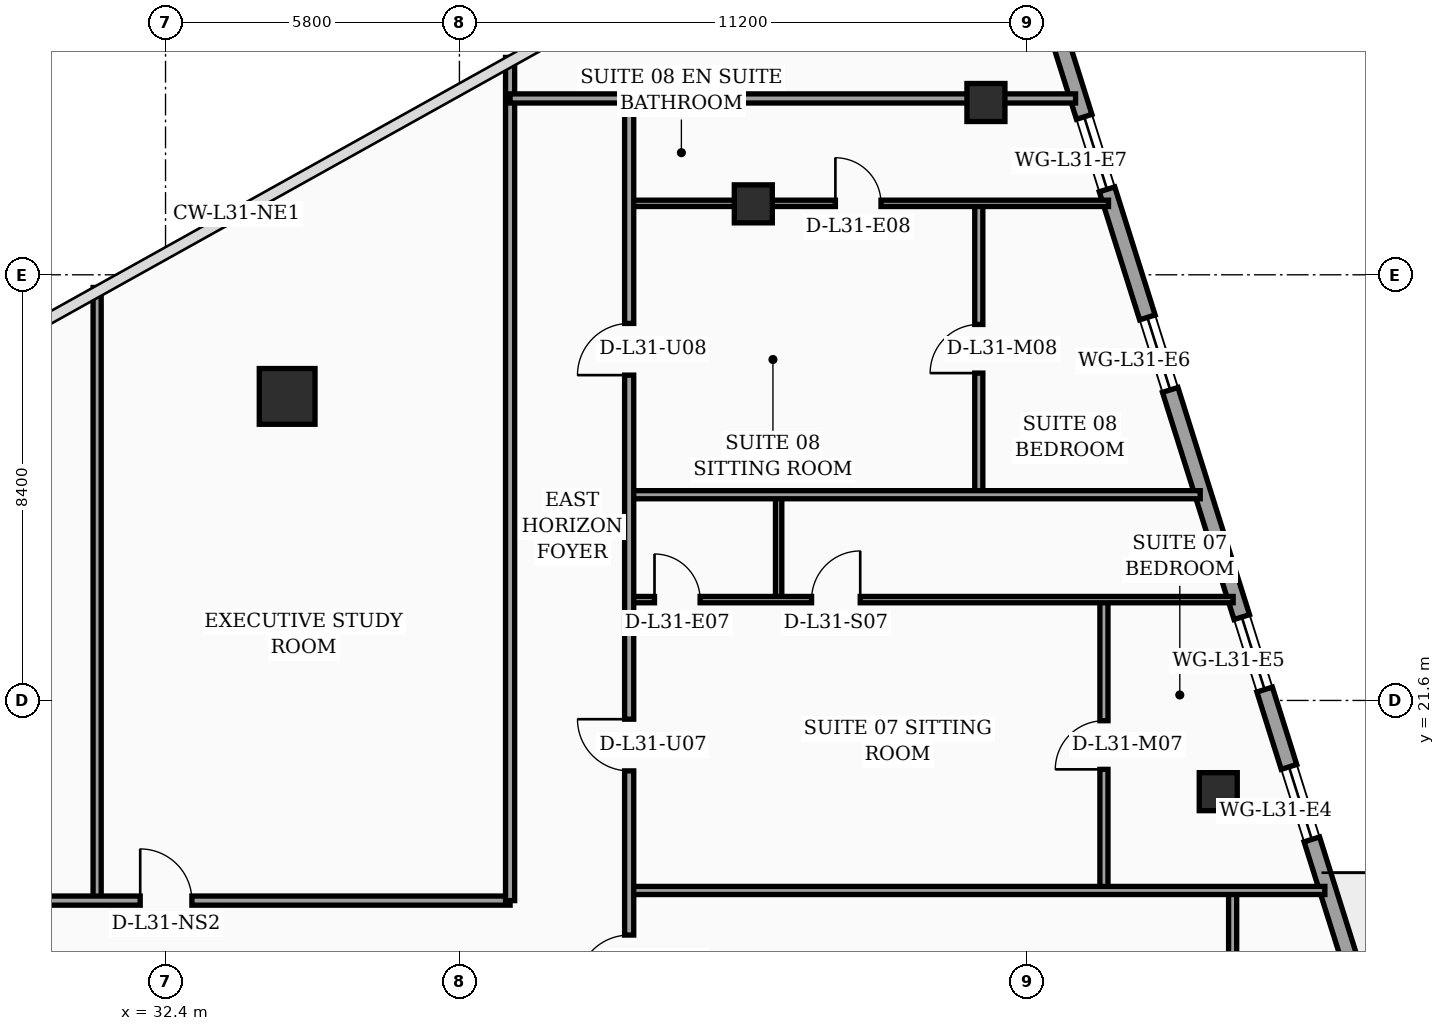
"""IFC4 building model, lengths in metres.
Left out: names, types, materials, properties, quantities, classifications, styles, units other than length and angle.
Written with IfcOpenShell. Run it as: python <this file> out.ifc"""

import sys

from ifc_helpers import new_model, si_unit, direction, frame, frame_2d, origin, origin_2d, place, context, subcontext, project, spatial, rectangle, hollow_rectangle, circle, extrude, element, fill, save


model = new_model("IFC4")
c1 = context("Model", 3, precision=1e-05, world=origin(), true_north=direction((0.0, 1.0)))
c2 = subcontext(c1, "Body", "Model", "MODEL_VIEW")
j1 = project(units=[si_unit("LENGTHUNIT", "METRE"), si_unit("PLANEANGLEUNIT", "RADIAN")], contexts=[c1])
p1 = place(None, origin())
s1 = spatial("IfcSite", under=j1, at=p1, CompositionType="ELEMENT")
p2 = place(p1, origin())
s2 = spatial("IfcBuilding", under=s1, at=p2, CompositionType="ELEMENT")
p3 = place(p2, frame((0.0, 0.0, 127.8)))
s3 = spatial("IfcBuildingStorey", under=s2, at=p3, CompositionType="ELEMENT", Elevation=127.8)
p4 = place(p3, frame((34.8, 27.6, 0.0), z_axis=(0.0, 0.0, 1.0), x_axis=(1.0, 0.0, 0.0)))
e1 = element("IfcColumn", 1, at=p4, inside=s3, PredefinedType="COLUMN", context=c2, shape_type="SweptSolid", body=[
    extrude(circle(Radius=0.55, at=origin_2d()), origin(), (0.0, 0.0, 1.0), 3.56),
])
for number, where, z_axis, x_axis in (
    (2, (44.0, 31.4, 0.0), (0.0, 0.0, 1.0), (1.0, 0.0, 0.0)),
    (3, (53.176, 19.8, 0.0), (0.0, 0.0, 1.0), (1.0, 0.0, 0.0)),
    (4, (48.591, 33.4, 0.0), (0.0, 0.0, 1.0), (1.0, 0.0, 0.0)),
):
    element("IfcColumn", number, at=place(p3, frame(where, z_axis=z_axis, x_axis=x_axis)), inside=s3, PredefinedType="COLUMN", context=c2, shape_type="SweptSolid", body=[
        extrude(hollow_rectangle(XDim=0.75, YDim=0.75, WallThickness=0.032, at=origin_2d()), origin(), (0.0, 0.0, 1.0), 3.56),
    ])
p5 = place(p3, frame((59.23, 5.505, 0.0), z_axis=(0.0, 0.0, 1.0), x_axis=(-0.300509063924, 0.953778958931, 0.0)))
e5 = element("IfcWall", 5, at=p5, inside=s3, PredefinedType="SOLIDWALL", context=c2, shape_type="SweptSolid", body=[
    extrude(rectangle(XDim=30.814, YDim=0.32, at=frame_2d((15.407, 0.0))), origin(), (0.0, 0.0, 1.0), 3.56),
])
p6 = place(p5, frame((10.199, 0.0, 0.0)))
e6 = element("IfcOpeningElement", 6, at=p6, cuts=e5, PredefinedType="OPENING", context=c2, shape_type="SweptSolid", body=[
    extrude(rectangle(XDim=1.4, YDim=2.25, at=frame_2d((0.7, 1.125))), frame((0.0, 0.17, 0.0), z_axis=(0.0, -1.0, 0.0), x_axis=(1.0, 0.0, 0.0)), (0.0, 0.0, 1.0), 0.34),
])
p7 = place(p5, frame((2.65, 0.0, 0.75)))
e7 = element("IfcOpeningElement", 7, at=p7, cuts=e5, PredefinedType="OPENING", context=c2, shape_type="SweptSolid", body=[
    extrude(rectangle(XDim=1.5, YDim=1.6, at=frame_2d((0.75, 0.8))), frame((0.0, 0.17, 0.0), z_axis=(0.0, -1.0, 0.0), x_axis=(1.0, 0.0, 0.0)), (0.0, 0.0, 1.0), 0.34),
])
p8 = place(p5, frame((4.7, 0.0, 0.75)))
e8 = element("IfcOpeningElement", 8, at=p8, cuts=e5, PredefinedType="OPENING", context=c2, shape_type="SweptSolid", body=[
    extrude(rectangle(XDim=1.5, YDim=1.6, at=frame_2d((0.75, 0.8))), frame((0.0, 0.17, 0.0), z_axis=(0.0, -1.0, 0.0), x_axis=(1.0, 0.0, 0.0)), (0.0, 0.0, 1.0), 0.34),
])
p9 = place(p5, frame((7.8, 0.0, 0.75)))
e9 = element("IfcOpeningElement", 9, at=p9, cuts=e5, PredefinedType="OPENING", context=c2, shape_type="SweptSolid", body=[
    extrude(rectangle(XDim=1.5, YDim=1.6, at=frame_2d((0.75, 0.8))), frame((0.0, 0.17, 0.0), z_axis=(0.0, -1.0, 0.0), x_axis=(1.0, 0.0, 0.0)), (0.0, 0.0, 1.0), 0.34),
])
p10 = place(p5, frame((14.0, 0.0, 0.75)))
e10 = element("IfcOpeningElement", 10, at=p10, cuts=e5, PredefinedType="OPENING", context=c2, shape_type="SweptSolid", body=[
    extrude(rectangle(XDim=1.5, YDim=1.6, at=frame_2d((0.75, 0.8))), frame((0.0, 0.17, 0.0), z_axis=(0.0, -1.0, 0.0), x_axis=(1.0, 0.0, 0.0)), (0.0, 0.0, 1.0), 0.34),
])
p11 = place(p5, frame((17.1, 0.0, 0.75)))
e11 = element("IfcOpeningElement", 11, at=p11, cuts=e5, PredefinedType="OPENING", context=c2, shape_type="SweptSolid", body=[
    extrude(rectangle(XDim=1.5, YDim=1.6, at=frame_2d((0.75, 0.8))), frame((0.0, 0.17, 0.0), z_axis=(0.0, -1.0, 0.0), x_axis=(1.0, 0.0, 0.0)), (0.0, 0.0, 1.0), 0.34),
])
p12 = place(p5, frame((23.3, 0.0, 0.75)))
e12 = element("IfcOpeningElement", 12, at=p12, cuts=e5, PredefinedType="OPENING", context=c2, shape_type="SweptSolid", body=[
    extrude(rectangle(XDim=1.5, YDim=1.6, at=frame_2d((0.75, 0.8))), frame((0.0, 0.17, 0.0), z_axis=(0.0, -1.0, 0.0), x_axis=(1.0, 0.0, 0.0)), (0.0, 0.0, 1.0), 0.34),
])
p13 = place(p5, frame((27.45, 0.0, 0.75)))
e13 = element("IfcOpeningElement", 13, at=p13, cuts=e5, PredefinedType="OPENING", context=c2, shape_type="SweptSolid", body=[
    extrude(rectangle(XDim=1.5, YDim=1.6, at=frame_2d((0.75, 0.8))), frame((0.0, 0.17, 0.0), z_axis=(0.0, -1.0, 0.0), x_axis=(1.0, 0.0, 0.0)), (0.0, 0.0, 1.0), 0.34),
])
p14 = place(p3, frame((31.05, 17.65, 0.0), z_axis=(0.0, 0.0, 1.0), x_axis=(0.0, 1.0, 0.0)))
e14 = element("IfcWall", 14, at=p14, inside=s3, PredefinedType="PARTITIONING", context=c2, shape_type="SweptSolid", body=[
    extrude(rectangle(XDim=12.1, YDim=0.16, at=frame_2d((6.05, 0.0))), origin(), (0.0, 0.0, 1.0), 2.84),
])
p15 = place(p3, frame((21.5, 17.65, 0.0), z_axis=(0.0, 0.0, 1.0), x_axis=(1.0, 0.0, 0.0)))
e15 = element("IfcWall", 15, at=p15, inside=s3, PredefinedType="PARTITIONING", context=c2, shape_type="SweptSolid", body=[
    extrude(rectangle(XDim=17.7, YDim=0.18, at=frame_2d((8.85, 0.0))), origin(), (0.0, 0.0, 1.0), 2.84),
])
p16 = place(p15, frame((0.95, 0.0, 0.0)))
e16 = element("IfcOpeningElement", 16, at=p16, cuts=e15, PredefinedType="OPENING", context=c2, shape_type="SweptSolid", body=[
    extrude(rectangle(XDim=1.02, YDim=2.2, at=frame_2d((0.51, 1.1))), frame((0.0, 0.1, 0.0), z_axis=(0.0, -1.0, 0.0), x_axis=(1.0, 0.0, 0.0)), (0.0, 0.0, 1.0), 0.2),
])
p17 = place(p15, frame((10.4, 0.0, 0.0)))
e17 = element("IfcOpeningElement", 17, at=p17, cuts=e15, PredefinedType="OPENING", context=c2, shape_type="SweptSolid", body=[
    extrude(rectangle(XDim=1.02, YDim=2.2, at=frame_2d((0.51, 1.1))), frame((0.0, 0.1, 0.0), z_axis=(0.0, -1.0, 0.0), x_axis=(1.0, 0.0, 0.0)), (0.0, 0.0, 1.0), 0.2),
])
p18 = place(p3, frame((39.2, 17.65, 0.0), z_axis=(0.0, 0.0, 1.0), x_axis=(0.0, 1.0, 0.0)))
e18 = element("IfcWall", 18, at=p18, inside=s3, PredefinedType="PARTITIONING", context=c2, shape_type="SweptSolid", body=[
    extrude(rectangle(XDim=16.64, YDim=0.18, at=frame_2d((8.32, 0.0))), origin(), (0.0, 0.0, 1.0), 2.84),
])
p19 = place(p3, frame((53.46, 7.45, 0.0), z_axis=(0.0, 0.0, 1.0), x_axis=(0.0, 1.0, 0.0)))
e19 = element("IfcWall", 19, at=p19, inside=s3, PredefinedType="PARTITIONING", context=c2, shape_type="SweptSolid", body=[
    extrude(rectangle(XDim=10.4, YDim=0.16, at=frame_2d((5.2, 0.0))), origin(), (0.0, 0.0, 1.0), 3.04),
])
p20 = place(p19, frame((4.72, 0.0, 0.0)))
e20 = element("IfcOpeningElement", 20, at=p20, cuts=e19, PredefinedType="OPENING", context=c2, shape_type="SweptSolid", body=[
    extrude(rectangle(XDim=0.96, YDim=2.2, at=frame_2d((0.48, 1.1))), frame((0.0, 0.09, 0.0), z_axis=(0.0, -1.0, 0.0), x_axis=(1.0, 0.0, 0.0)), (0.0, 0.0, 1.0), 0.18),
])
p21 = place(p3, frame((44.5, 23.59, 0.0), z_axis=(0.0, 0.0, 1.0), x_axis=(0.0, 1.0, 0.0)))
e21 = element("IfcWall", 21, at=p21, inside=s3, PredefinedType="PARTITIONING", context=c2, shape_type="SweptSolid", body=[
    extrude(rectangle(XDim=2.07, YDim=0.125, at=frame_2d((1.035, 0.0))), origin(), (0.0, 0.0, 1.0), 3.19),
])
p22 = place(p3, frame((50.92, 17.85, 0.0), z_axis=(0.0, 0.0, 1.0), x_axis=(0.0, 1.0, 0.0)))
e22 = element("IfcWall", 22, at=p22, inside=s3, PredefinedType="PARTITIONING", context=c2, shape_type="SweptSolid", body=[
    extrude(rectangle(XDim=5.74, YDim=0.16, at=frame_2d((2.87, 0.0))), origin(), (0.0, 0.0, 1.0), 2.84),
])
p23 = place(p22, frame((2.39, 0.0, 0.0)))
e23 = element("IfcOpeningElement", 23, at=p23, cuts=e22, PredefinedType="OPENING", context=c2, shape_type="SweptSolid", body=[
    extrude(rectangle(XDim=0.96, YDim=2.2, at=frame_2d((0.48, 1.1))), frame((0.0, 0.09, 0.0), z_axis=(0.0, -1.0, 0.0), x_axis=(1.0, 0.0, 0.0)), (0.0, 0.0, 1.0), 0.18),
])
p24 = place(p3, frame((41.55, 23.59, 0.0), z_axis=(0.0, 0.0, 1.0), x_axis=(1.0, 0.0, 0.0)))
e24 = element("IfcWall", 24, at=p24, inside=s3, PredefinedType="PARTITIONING", context=c2, shape_type="SweptSolid", body=[
    extrude(rectangle(XDim=11.92, YDim=0.125, at=frame_2d((5.96, 0.0))), origin(), (0.0, 0.0, 1.0), 2.84),
])
p25 = place(p24, frame((0.5, 0.0, 0.0)))
e25 = element("IfcOpeningElement", 25, at=p25, cuts=e24, PredefinedType="OPENING", context=c2, shape_type="SweptSolid", body=[
    extrude(rectangle(XDim=0.9, YDim=2.15, at=frame_2d((0.45, 1.075))), frame((0.0, 0.073, 0.0), z_axis=(0.0, -1.0, 0.0), x_axis=(1.0, 0.0, 0.0)), (0.0, 0.0, 1.0), 0.145),
])
p26 = place(p24, frame((3.6, 0.0, 0.0)))
e26 = element("IfcOpeningElement", 26, at=p26, cuts=e24, PredefinedType="OPENING", context=c2, shape_type="SweptSolid", body=[
    extrude(rectangle(XDim=0.96, YDim=2.2, at=frame_2d((0.48, 1.1))), frame((0.0, 0.073, 0.0), z_axis=(0.0, -1.0, 0.0), x_axis=(1.0, 0.0, 0.0)), (0.0, 0.0, 1.0), 0.145),
])
p27 = place(p3, frame((48.45, 25.66, 0.0), z_axis=(0.0, 0.0, 1.0), x_axis=(0.0, 1.0, 0.0)))
e27 = element("IfcWall", 27, at=p27, inside=s3, PredefinedType="PARTITIONING", context=c2, shape_type="SweptSolid", body=[
    extrude(rectangle(XDim=5.75, YDim=0.16, at=frame_2d((2.875, 0.0))), origin(), (0.0, 0.0, 1.0), 3.56),
])
p28 = place(p27, frame((2.4, 0.0, 0.0)))
e28 = element("IfcOpeningElement", 28, at=p28, cuts=e27, PredefinedType="OPENING", context=c2, shape_type="SweptSolid", body=[
    extrude(rectangle(XDim=0.96, YDim=2.2, at=frame_2d((0.48, 1.1))), frame((0.0, 0.09, 0.0), z_axis=(0.0, -1.0, 0.0), x_axis=(1.0, 0.0, 0.0)), (0.0, 0.0, 1.0), 0.18),
])
p29 = place(p3, frame((41.55, 31.41, 0.0), z_axis=(0.0, 0.0, 1.0), x_axis=(1.0, 0.0, 0.0)))
e29 = element("IfcWall", 29, at=p29, inside=s3, PredefinedType="PARTITIONING", context=c2, shape_type="SweptSolid", body=[
    extrude(rectangle(XDim=9.46, YDim=0.125, at=frame_2d((4.73, 0.0))), origin(), (0.0, 0.0, 1.0), 2.84),
])
p30 = place(p29, frame((4.07, 0.0, 0.0)))
e30 = element("IfcOpeningElement", 30, at=p30, cuts=e29, PredefinedType="OPENING", context=c2, shape_type="SweptSolid", body=[
    extrude(rectangle(XDim=0.9, YDim=2.15, at=frame_2d((0.45, 1.075))), frame((0.0, 0.073, 0.0), z_axis=(0.0, -1.0, 0.0), x_axis=(1.0, 0.0, 0.0)), (0.0, 0.0, 1.0), 0.145),
])
p31 = place(p3, frame((41.55, 25.66, 0.0), z_axis=(0.0, 0.0, 1.0), x_axis=(1.0, 0.0, 0.0)))
e31 = element("IfcWall", 31, at=p31, inside=s3, PredefinedType="PARTITIONING", context=c2, shape_type="SweptSolid", body=[
    extrude(rectangle(XDim=11.27, YDim=0.16, at=frame_2d((5.635, 0.0))), origin(), (0.0, 0.0, 1.0), 2.84),
])
p32 = place(p3, frame((41.55, 17.85, 0.0), z_axis=(0.0, 0.0, 1.0), x_axis=(1.0, 0.0, 0.0)))
e32 = element("IfcWall", 32, at=p32, inside=s3, PredefinedType="PARTITIONING", context=c2, shape_type="SweptSolid", body=[
    extrude(rectangle(XDim=13.73, YDim=0.16, at=frame_2d((6.865, 0.0))), origin(), (0.0, 0.0, 1.0), 2.84),
])
p33 = place(p3, frame((41.55, 33.48, 0.0), z_axis=(0.0, 0.0, 1.0), x_axis=(1.0, 0.0, 0.0)))
e33 = element("IfcWall", 33, at=p33, inside=s3, PredefinedType="PARTITIONING", context=c2, shape_type="SweptSolid", body=[
    extrude(rectangle(XDim=8.81, YDim=0.18, at=frame_2d((4.405, 0.0))), origin(), (0.0, 0.0, 1.0), 2.84),
])
p34 = place(p3, frame((41.55, 2.44, 0.0), z_axis=(0.0, 0.0, 1.0), x_axis=(0.0, 1.0, 0.0)))
e34 = element("IfcWall", 34, at=p34, inside=s3, PredefinedType="PARTITIONING", context=c2, shape_type="SweptSolid", body=[
    extrude(rectangle(XDim=31.04, YDim=0.18, at=frame_2d((15.52, 0.0))), origin(), (0.0, 0.0, 1.0), 2.84),
])
p35 = place(p34, frame((13.51, 0.0, 0.0)))
e35 = element("IfcOpeningElement", 35, at=p35, cuts=e34, PredefinedType="OPENING", context=c2, shape_type="SweptSolid", body=[
    extrude(rectangle(XDim=1.02, YDim=2.2, at=frame_2d((0.51, 1.1))), frame((0.0, 0.1, 0.0), z_axis=(0.0, -1.0, 0.0), x_axis=(1.0, 0.0, 0.0)), (0.0, 0.0, 1.0), 0.2),
])
p36 = place(p34, frame((17.77, 0.0, 0.0)))
e36 = element("IfcOpeningElement", 36, at=p36, cuts=e34, PredefinedType="OPENING", context=c2, shape_type="SweptSolid", body=[
    extrude(rectangle(XDim=1.02, YDim=2.2, at=frame_2d((0.51, 1.1))), frame((0.0, 0.1, 0.0), z_axis=(0.0, -1.0, 0.0), x_axis=(1.0, 0.0, 0.0)), (0.0, 0.0, 1.0), 0.2),
])
p37 = place(p34, frame((25.58, 0.0, 0.0)))
e37 = element("IfcOpeningElement", 37, at=p37, cuts=e34, PredefinedType="OPENING", context=c2, shape_type="SweptSolid", body=[
    extrude(rectangle(XDim=1.02, YDim=2.2, at=frame_2d((0.51, 1.1))), frame((0.0, 0.1, 0.0), z_axis=(0.0, -1.0, 0.0), x_axis=(1.0, 0.0, 0.0)), (0.0, 0.0, 1.0), 0.2),
])
p38 = place(p3, frame((39.2, 33.48, 0.0), z_axis=(0.0, 0.0, 1.0), x_axis=(1.0, 0.0, 0.0)))
e38 = element("IfcWall", 38, at=p38, inside=s3, PredefinedType="PARTITIONING", context=c2, shape_type="SweptSolid", body=[
    extrude(rectangle(XDim=2.35, YDim=0.18, at=frame_2d((1.175, 0.0))), origin(), (0.0, 0.0, 1.0), 3.56),
])
p39 = place(p10, origin())
e39 = element("IfcWindow", 39, at=p39, inside=s3, PartitioningType="SINGLE_PANEL", PredefinedType="WINDOW", context=c2, shape_type="SweptSolid", body=[
    extrude(rectangle(XDim=1.5, YDim=1.6, at=frame_2d((0.75, 0.8))), frame((0.0, 0.03, 0.0), z_axis=(0.0, -1.0, 0.0), x_axis=(1.0, 0.0, 0.0)), (0.0, 0.0, 1.0), 0.06),
])
fill(e10, e39)
p40 = place(p11, origin())
e40 = element("IfcWindow", 40, at=p40, inside=s3, PartitioningType="SINGLE_PANEL", PredefinedType="WINDOW", context=c2, shape_type="SweptSolid", body=[
    extrude(rectangle(XDim=1.5, YDim=1.6, at=frame_2d((0.75, 0.8))), frame((0.0, 0.03, 0.0), z_axis=(0.0, -1.0, 0.0), x_axis=(1.0, 0.0, 0.0)), (0.0, 0.0, 1.0), 0.06),
])
fill(e11, e40)
p41 = place(p12, origin())
e41 = element("IfcWindow", 41, at=p41, inside=s3, PartitioningType="SINGLE_PANEL", PredefinedType="WINDOW", context=c2, shape_type="SweptSolid", body=[
    extrude(rectangle(XDim=1.5, YDim=1.6, at=frame_2d((0.75, 0.8))), frame((0.0, 0.03, 0.0), z_axis=(0.0, -1.0, 0.0), x_axis=(1.0, 0.0, 0.0)), (0.0, 0.0, 1.0), 0.06),
])
fill(e12, e41)
p42 = place(p13, origin())
e42 = element("IfcWindow", 42, at=p42, inside=s3, PartitioningType="SINGLE_PANEL", PredefinedType="WINDOW", context=c2, shape_type="SweptSolid", body=[
    extrude(rectangle(XDim=1.5, YDim=1.6, at=frame_2d((0.75, 0.8))), frame((0.0, 0.03, 0.0), z_axis=(0.0, -1.0, 0.0), x_axis=(1.0, 0.0, 0.0)), (0.0, 0.0, 1.0), 0.06),
])
fill(e13, e42)
p43 = place(p17, origin())
e43 = element("IfcDoor", 43, at=p43, inside=s3, OperationType="SINGLE_SWING_LEFT", PredefinedType="DOOR", context=c2, shape_type="SweptSolid", body=[
    extrude(rectangle(XDim=1.02, YDim=2.2, at=frame_2d((0.51, 1.1))), frame((0.0, 0.025, 0.0), z_axis=(0.0, -1.0, 0.0), x_axis=(1.0, 0.0, 0.0)), (0.0, 0.0, 1.0), 0.05),
])
fill(e17, e43)
p44 = place(p23, origin())
e44 = element("IfcDoor", 44, at=p44, inside=s3, OperationType="SINGLE_SWING_LEFT", PredefinedType="DOOR", context=c2, shape_type="SweptSolid", body=[
    extrude(rectangle(XDim=0.96, YDim=2.2, at=frame_2d((0.48, 1.1))), frame((0.0, 0.025, 0.0), z_axis=(0.0, -1.0, 0.0), x_axis=(1.0, 0.0, 0.0)), (0.0, 0.0, 1.0), 0.05),
])
fill(e23, e44)
p45 = place(p25, origin())
e45 = element("IfcDoor", 45, at=p45, inside=s3, OperationType="SINGLE_SWING_LEFT", PredefinedType="DOOR", context=c2, shape_type="SweptSolid", body=[
    extrude(rectangle(XDim=0.9, YDim=2.15, at=frame_2d((0.45, 1.075))), frame((0.0, 0.025, 0.0), z_axis=(0.0, -1.0, 0.0), x_axis=(1.0, 0.0, 0.0)), (0.0, 0.0, 1.0), 0.05),
])
fill(e25, e45)
p46 = place(p26, origin())
e46 = element("IfcDoor", 46, at=p46, inside=s3, OperationType="SINGLE_SWING_RIGHT", PredefinedType="DOOR", context=c2, shape_type="SweptSolid", body=[
    extrude(rectangle(XDim=0.96, YDim=2.2, at=frame_2d((0.48, 1.1))), frame((0.0, 0.025, 0.0), z_axis=(0.0, -1.0, 0.0), x_axis=(1.0, 0.0, 0.0)), (0.0, 0.0, 1.0), 0.05),
])
fill(e26, e46)
p47 = place(p28, origin())
e47 = element("IfcDoor", 47, at=p47, inside=s3, OperationType="SINGLE_SWING_LEFT", PredefinedType="DOOR", context=c2, shape_type="SweptSolid", body=[
    extrude(rectangle(XDim=0.96, YDim=2.2, at=frame_2d((0.48, 1.1))), frame((0.0, 0.025, 0.0), z_axis=(0.0, -1.0, 0.0), x_axis=(1.0, 0.0, 0.0)), (0.0, 0.0, 1.0), 0.05),
])
fill(e28, e47)
p48 = place(p30, origin())
e48 = element("IfcDoor", 48, at=p48, inside=s3, OperationType="SINGLE_SWING_LEFT", PredefinedType="DOOR", context=c2, shape_type="SweptSolid", body=[
    extrude(rectangle(XDim=0.9, YDim=2.15, at=frame_2d((0.45, 1.075))), frame((0.0, 0.025, 0.0), z_axis=(0.0, -1.0, 0.0), x_axis=(1.0, 0.0, 0.0)), (0.0, 0.0, 1.0), 0.05),
])
fill(e30, e48)
p49 = place(p35, origin())
e49 = element("IfcDoor", 49, at=p49, inside=s3, OperationType="SINGLE_SWING_LEFT", PredefinedType="DOOR", context=c2, shape_type="SweptSolid", body=[
    extrude(rectangle(XDim=1.02, YDim=2.2, at=frame_2d((0.51, 1.1))), frame((0.0, 0.025, 0.0), z_axis=(0.0, -1.0, 0.0), x_axis=(1.0, 0.0, 0.0)), (0.0, 0.0, 1.0), 0.05),
])
fill(e35, e49)
p50 = place(p36, origin())
e50 = element("IfcDoor", 50, at=p50, inside=s3, OperationType="SINGLE_SWING_RIGHT", PredefinedType="DOOR", context=c2, shape_type="SweptSolid", body=[
    extrude(rectangle(XDim=1.02, YDim=2.2, at=frame_2d((0.51, 1.1))), frame((0.0, 0.025, 0.0), z_axis=(0.0, -1.0, 0.0), x_axis=(1.0, 0.0, 0.0)), (0.0, 0.0, 1.0), 0.05),
])
fill(e36, e50)
p51 = place(p37, origin())
e51 = element("IfcDoor", 51, at=p51, inside=s3, OperationType="SINGLE_SWING_LEFT", PredefinedType="DOOR", context=c2, shape_type="SweptSolid", body=[
    extrude(rectangle(XDim=1.02, YDim=2.2, at=frame_2d((0.51, 1.1))), frame((0.0, 0.025, 0.0), z_axis=(0.0, -1.0, 0.0), x_axis=(1.0, 0.0, 0.0)), (0.0, 0.0, 1.0), 0.05),
])
fill(e37, e51)
save(model, sys.argv[1])
